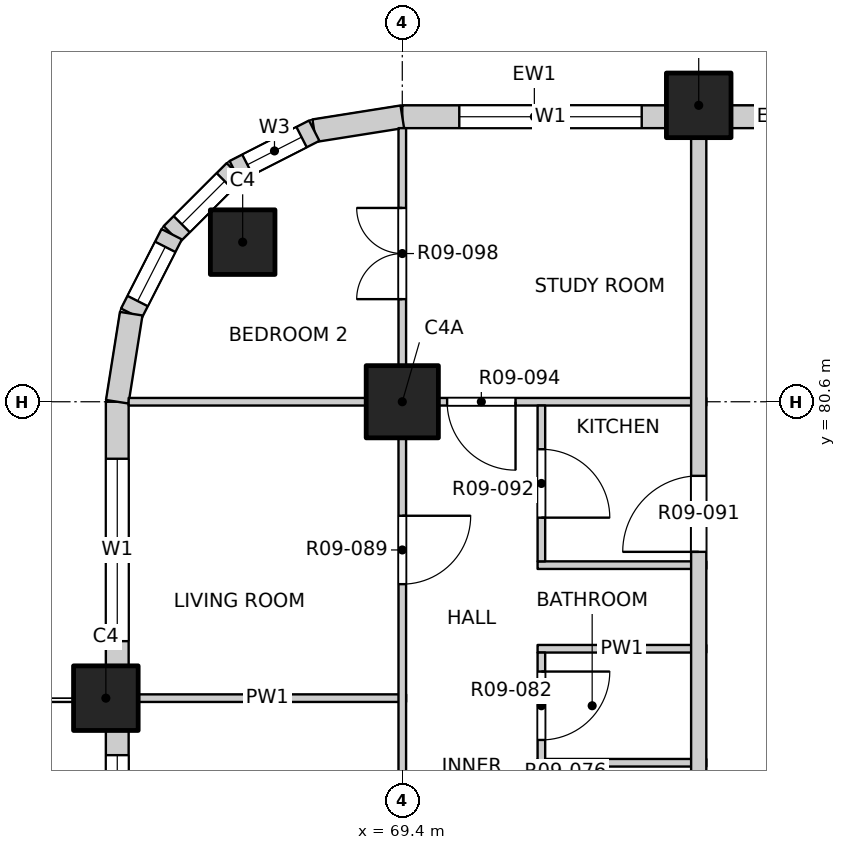
"""IFC4 building model, lengths in metres.
Left out: names, types, materials, properties, quantities, classifications, styles, units other than length and angle.
Written with IfcOpenShell. Run it as: python <this file> out.ifc"""

import sys

from ifc_helpers import new_model, si_unit, direction, frame, frame_2d, origin, origin_2d, place, context, subcontext, project, spatial, rectangle, extrude, element, fill, save


model = new_model("IFC4")
c1 = context("Model", 3, precision=1e-05, world=origin(), true_north=direction((0.0, 1.0)))
c2 = subcontext(c1, "Body", "Model", "MODEL_VIEW")
j1 = project(units=[si_unit("LENGTHUNIT", "METRE"), si_unit("PLANEANGLEUNIT", "RADIAN")], contexts=[c1])
p1 = place(None, origin())
s1 = spatial("IfcSite", under=j1, at=p1, CompositionType="ELEMENT")
p2 = place(p1, origin())
s2 = spatial("IfcBuilding", under=s1, at=p2, CompositionType="ELEMENT")
p3 = place(p2, frame((0.0, 0.0, 110.1)))
s3 = spatial("IfcBuildingStorey", under=s2, at=p3, CompositionType="ELEMENT", Elevation=110.1)
for number, where, z_axis, x_axis in (
    (1, (67.3, 82.7, -0.25), (0.0, 0.0, 1.0), (1.0, 0.0, 0.0)),
    (2, (73.3, 84.5, -0.25), (0.0, 0.0, 1.0), (1.0, 0.0, 0.0)),
    (3, (65.5, 76.7, -0.25), (0.0, 0.0, 1.0), (1.0, 0.0, 0.0)),
):
    element("IfcColumn", number, at=place(p3, frame(where, z_axis=z_axis, x_axis=x_axis)), inside=s3, PredefinedType="COLUMN", context=c2, shape_type="SweptSolid", body=[
        extrude(rectangle(XDim=0.85, YDim=0.85, at=origin_2d()), origin(), (0.0, 0.0, 1.0), 3.4),
    ])
p4 = place(p3, frame((69.4, 80.6, -0.25), z_axis=(0.0, 0.0, 1.0), x_axis=(1.0, 0.0, 0.0)))
e4 = element("IfcColumn", 4, at=p4, inside=s3, PredefinedType="COLUMN", context=c2, shape_type="SweptSolid", body=[
    extrude(rectangle(XDim=0.95, YDim=0.95, at=origin_2d()), origin(), (0.0, 0.0, 1.0), 3.4),
])
p5 = place(p3, frame((69.4, 84.35, 0.0), z_axis=(0.0, 0.0, 1.0), x_axis=(1.0, 0.0, 0.0)))
e5 = element("IfcWall", 5, at=p5, inside=s3, PredefinedType="SOLIDWALL", context=c2, shape_type="SweptSolid", body=[
    extrude(rectangle(XDim=3.475, YDim=0.3, at=frame_2d((1.738, 0.0))), origin(), (0.0, 0.0, 1.0), 2.7),
])
p6 = place(p5, frame((0.75, 0.0, 0.9)))
e6 = element("IfcOpeningElement", 6, at=p6, cuts=e5, PredefinedType="OPENING", context=c2, shape_type="SweptSolid", body=[
    extrude(rectangle(XDim=2.4, YDim=1.8, at=frame_2d((1.2, 0.9))), frame((0.0, 0.16, 0.0), z_axis=(0.0, -1.0, 0.0), x_axis=(1.0, 0.0, 0.0)), (0.0, 0.0, 1.0), 0.32),
])
p7 = place(p3, frame((73.725, 84.35, 0.0), z_axis=(0.0, 0.0, 1.0), x_axis=(1.0, 0.0, 0.0)))
e7 = element("IfcWall", 7, at=p7, inside=s3, PredefinedType="SOLIDWALL", context=c2, shape_type="SweptSolid", body=[
    extrude(rectangle(XDim=1.25, YDim=0.3, at=frame_2d((0.625, 0.0))), origin(), (0.0, 0.0, 1.0), 2.7),
])
p8 = place(p3, frame((65.65, 69.325, 0.0), z_axis=(0.0, 0.0, 1.0), x_axis=(0.0, 1.0, 0.0)))
e8 = element("IfcWall", 8, at=p8, inside=s3, PredefinedType="SOLIDWALL", context=c2, shape_type="SweptSolid", body=[
    extrude(rectangle(XDim=6.95, YDim=0.3, at=frame_2d((3.475, 0.0))), origin(), (0.0, 0.0, 1.0), 2.7),
])
p9 = place(p8, frame((0.625, 0.0, 0.0)))
e9 = element("IfcOpeningElement", 9, at=p9, cuts=e8, PredefinedType="OPENING", context=c2, shape_type="SweptSolid", body=[
    extrude(rectangle(XDim=1.8, YDim=2.4, at=frame_2d((0.9, 1.2))), frame((0.0, 0.16, 0.0), z_axis=(0.0, -1.0, 0.0), x_axis=(1.0, 0.0, 0.0)), (0.0, 0.0, 1.0), 0.32),
])
p10 = place(p8, frame((4.225, 0.0, 0.9)))
e10 = element("IfcOpeningElement", 10, at=p10, cuts=e8, PredefinedType="OPENING", context=c2, shape_type="SweptSolid", body=[
    extrude(rectangle(XDim=2.4, YDim=1.8, at=frame_2d((1.2, 0.9))), frame((0.0, 0.16, 0.0), z_axis=(0.0, -1.0, 0.0), x_axis=(1.0, 0.0, 0.0)), (0.0, 0.0, 1.0), 0.32),
])
p11 = place(p3, frame((65.65, 77.125, 0.0), z_axis=(0.0, 0.0, 1.0), x_axis=(0.0, 1.0, 0.0)))
e11 = element("IfcWall", 11, at=p11, inside=s3, PredefinedType="SOLIDWALL", context=c2, shape_type="SweptSolid", body=[
    extrude(rectangle(XDim=3.475, YDim=0.3, at=frame_2d((1.738, 0.0))), origin(), (0.0, 0.0, 1.0), 2.7),
])
p12 = place(p11, frame((0.325, 0.0, 0.9)))
e12 = element("IfcOpeningElement", 12, at=p12, cuts=e11, PredefinedType="OPENING", context=c2, shape_type="SweptSolid", body=[
    extrude(rectangle(XDim=2.4, YDim=1.8, at=frame_2d((1.2, 0.9))), frame((0.0, 0.16, 0.0), z_axis=(0.0, -1.0, 0.0), x_axis=(1.0, 0.0, 0.0)), (0.0, 0.0, 1.0), 0.32),
])
p13 = place(p3, frame((69.4, 84.35, 0.0), z_axis=(0.0, 0.0, 1.0), x_axis=(-0.987678452879, -0.156496880861, 0.0)))
e13 = element("IfcWall", 13, at=p13, inside=s3, PredefinedType="SOLIDWALL", context=c2, shape_type="SweptSolid", body=[
    extrude(rectangle(XDim=1.173, YDim=0.3, at=frame_2d((0.586, 0.0))), origin(), (0.0, 0.0, 1.0), 2.7),
])
p14 = place(p3, frame((68.241, 84.167, 0.0), z_axis=(0.0, 0.0, 1.0), x_axis=(-0.890988677504, -0.454025524128, 0.0)))
e14 = element("IfcWall", 14, at=p14, inside=s3, PredefinedType="SOLIDWALL", context=c2, shape_type="SweptSolid", body=[
    extrude(rectangle(XDim=1.173, YDim=0.3, at=frame_2d((0.587, 0.0))), origin(), (0.0, 0.0, 1.0), 2.7),
])
p15 = place(p14, frame((0.187, 0.0, 0.9)))
e15 = element("IfcOpeningElement", 15, at=p15, cuts=e14, PredefinedType="OPENING", context=c2, shape_type="SweptSolid", body=[
    extrude(rectangle(XDim=0.8, YDim=1.2, at=frame_2d((0.4, 0.6))), frame((0.0, 0.16, 0.0), z_axis=(0.0, -1.0, 0.0), x_axis=(1.0, 0.0, 0.0)), (0.0, 0.0, 1.0), 0.32),
])
p16 = place(p3, frame((67.196, 83.634, 0.0), z_axis=(0.0, 0.0, 1.0), x_axis=(-0.707106781187, -0.707106781187, 0.0)))
e16 = element("IfcWall", 16, at=p16, inside=s3, PredefinedType="SOLIDWALL", context=c2, shape_type="SweptSolid", body=[
    extrude(rectangle(XDim=1.173, YDim=0.3, at=frame_2d((0.586, 0.0))), origin(), (0.0, 0.0, 1.0), 2.7),
])
p17 = place(p16, frame((0.187, 0.0, 0.9)))
e17 = element("IfcOpeningElement", 17, at=p17, cuts=e16, PredefinedType="OPENING", context=c2, shape_type="SweptSolid", body=[
    extrude(rectangle(XDim=0.8, YDim=1.2, at=frame_2d((0.4, 0.6))), frame((0.0, 0.16, 0.0), z_axis=(0.0, -1.0, 0.0), x_axis=(1.0, 0.0, 0.0)), (0.0, 0.0, 1.0), 0.32),
])
p18 = place(p3, frame((66.366, 82.804, 0.0), z_axis=(0.0, 0.0, 1.0), x_axis=(-0.454025524128, -0.890988677504, 0.0)))
e18 = element("IfcWall", 18, at=p18, inside=s3, PredefinedType="SOLIDWALL", context=c2, shape_type="SweptSolid", body=[
    extrude(rectangle(XDim=1.173, YDim=0.3, at=frame_2d((0.587, 0.0))), origin(), (0.0, 0.0, 1.0), 2.7),
])
p19 = place(p18, frame((0.187, 0.0, 0.9)))
e19 = element("IfcOpeningElement", 19, at=p19, cuts=e18, PredefinedType="OPENING", context=c2, shape_type="SweptSolid", body=[
    extrude(rectangle(XDim=0.8, YDim=1.2, at=frame_2d((0.4, 0.6))), frame((0.0, 0.16, 0.0), z_axis=(0.0, -1.0, 0.0), x_axis=(1.0, 0.0, 0.0)), (0.0, 0.0, 1.0), 0.32),
])
p20 = place(p3, frame((65.833, 81.759, 0.0), z_axis=(0.0, 0.0, 1.0), x_axis=(-0.156496880861, -0.987678452879, 0.0)))
e20 = element("IfcWall", 20, at=p20, inside=s3, PredefinedType="SOLIDWALL", context=c2, shape_type="SweptSolid", body=[
    extrude(rectangle(XDim=1.173, YDim=0.3, at=frame_2d((0.586, 0.0))), origin(), (0.0, 0.0, 1.0), 2.7),
])
p21 = place(p3, frame((71.18, 75.85, 0.0), z_axis=(0.0, 0.0, 1.0), x_axis=(1.0, 0.0, 0.0)))
e21 = element("IfcWall", 21, at=p21, inside=s3, PredefinedType="PARTITIONING", context=c2, shape_type="SweptSolid", body=[
    extrude(rectangle(XDim=2.22, YDim=0.1, at=frame_2d((1.11, 0.0))), origin(), (0.0, 0.0, 1.0), 3.15),
])
p22 = place(p3, frame((65.8, 76.7, 0.0), z_axis=(0.0, 0.0, 1.0), x_axis=(1.0, 0.0, 0.0)))
e22 = element("IfcWall", 22, at=p22, inside=s3, PredefinedType="PARTITIONING", context=c2, shape_type="SweptSolid", body=[
    extrude(rectangle(XDim=3.65, YDim=0.1, at=frame_2d((1.825, 0.0))), origin(), (0.0, 0.0, 1.0), 2.55),
])
for number, where, z_axis, x_axis in (
    (23, (71.18, 77.35, 0.0), (0.0, 0.0, 1.0), (1.0, 0.0, 0.0)),
    (24, (71.18, 78.45, 0.0), (0.0, 0.0, 1.0), (1.0, 0.0, 0.0)),
):
    element("IfcWall", number, at=place(p3, frame(where, z_axis=z_axis, x_axis=x_axis)), inside=s3, PredefinedType="PARTITIONING", context=c2, shape_type="SweptSolid", body=[
        extrude(rectangle(XDim=2.22, YDim=0.1, at=frame_2d((1.11, 0.0))), origin(), (0.0, 0.0, 1.0), 3.15),
    ])
p23 = place(p3, frame((65.8, 80.6, 0.0), z_axis=(0.0, 0.0, 1.0), x_axis=(1.0, 0.0, 0.0)))
e25 = element("IfcWall", 25, at=p23, inside=s3, PredefinedType="PARTITIONING", context=c2, shape_type="SweptSolid", body=[
    extrude(rectangle(XDim=7.6, YDim=0.1, at=frame_2d((3.8, 0.0))), origin(), (0.0, 0.0, 1.0), 3.15),
])
p24 = place(p23, frame((4.19, 0.0, 0.0)))
e26 = element("IfcOpeningElement", 26, at=p24, cuts=e25, PredefinedType="OPENING", context=c2, shape_type="SweptSolid", body=[
    extrude(rectangle(XDim=0.9, YDim=2.1, at=frame_2d((0.45, 1.05))), frame((0.0, 0.06, 0.0), z_axis=(0.0, -1.0, 0.0), x_axis=(1.0, 0.0, 0.0)), (0.0, 0.0, 1.0), 0.12),
])
p25 = place(p3, frame((69.4, 45.8, 0.0), z_axis=(0.0, 0.0, 1.0), x_axis=(0.0, 1.0, 0.0)))
e27 = element("IfcWall", 27, at=p25, inside=s3, PredefinedType="PARTITIONING", context=c2, shape_type="SweptSolid", body=[
    extrude(rectangle(XDim=38.4, YDim=0.1, at=frame_2d((19.2, 0.0))), origin(), (0.0, 0.0, 1.0), 3.15),
])
p26 = place(p25, frame((1.05, 0.0, 0.0)))
e28 = element("IfcOpeningElement", 28, at=p26, cuts=e27, PredefinedType="OPENING", context=c2, shape_type="SweptSolid", body=[
    extrude(rectangle(XDim=1.2, YDim=2.1, at=frame_2d((0.6, 1.05))), frame((0.0, 0.06, 0.0), z_axis=(0.0, -1.0, 0.0), x_axis=(1.0, 0.0, 0.0)), (0.0, 0.0, 1.0), 0.12),
])
p27 = place(p25, frame((5.1, 0.0, 0.0)))
e29 = element("IfcOpeningElement", 29, at=p27, cuts=e27, PredefinedType="OPENING", context=c2, shape_type="SweptSolid", body=[
    extrude(rectangle(XDim=0.9, YDim=2.1, at=frame_2d((0.45, 1.05))), frame((0.0, 0.06, 0.0), z_axis=(0.0, -1.0, 0.0), x_axis=(1.0, 0.0, 0.0)), (0.0, 0.0, 1.0), 0.12),
])
p28 = place(p25, frame((9.0, 0.0, 0.0)))
e30 = element("IfcOpeningElement", 30, at=p28, cuts=e27, PredefinedType="OPENING", context=c2, shape_type="SweptSolid", body=[
    extrude(rectangle(XDim=0.9, YDim=2.1, at=frame_2d((0.45, 1.05))), frame((0.0, 0.06, 0.0), z_axis=(0.0, -1.0, 0.0), x_axis=(1.0, 0.0, 0.0)), (0.0, 0.0, 1.0), 0.12),
])
p29 = place(p25, frame((12.9, 0.0, 0.0)))
e31 = element("IfcOpeningElement", 31, at=p29, cuts=e27, PredefinedType="OPENING", context=c2, shape_type="SweptSolid", body=[
    extrude(rectangle(XDim=0.9, YDim=2.1, at=frame_2d((0.45, 1.05))), frame((0.0, 0.06, 0.0), z_axis=(0.0, -1.0, 0.0), x_axis=(1.0, 0.0, 0.0)), (0.0, 0.0, 1.0), 0.12),
])
p30 = place(p25, frame((16.8, 0.0, 0.0)))
e32 = element("IfcOpeningElement", 32, at=p30, cuts=e27, PredefinedType="OPENING", context=c2, shape_type="SweptSolid", body=[
    extrude(rectangle(XDim=0.9, YDim=2.1, at=frame_2d((0.45, 1.05))), frame((0.0, 0.06, 0.0), z_axis=(0.0, -1.0, 0.0), x_axis=(1.0, 0.0, 0.0)), (0.0, 0.0, 1.0), 0.12),
])
p31 = place(p25, frame((20.7, 0.0, 0.0)))
e33 = element("IfcOpeningElement", 33, at=p31, cuts=e27, PredefinedType="OPENING", context=c2, shape_type="SweptSolid", body=[
    extrude(rectangle(XDim=0.9, YDim=2.1, at=frame_2d((0.45, 1.05))), frame((0.0, 0.06, 0.0), z_axis=(0.0, -1.0, 0.0), x_axis=(1.0, 0.0, 0.0)), (0.0, 0.0, 1.0), 0.12),
])
p32 = place(p25, frame((24.6, 0.0, 0.0)))
e34 = element("IfcOpeningElement", 34, at=p32, cuts=e27, PredefinedType="OPENING", context=c2, shape_type="SweptSolid", body=[
    extrude(rectangle(XDim=0.9, YDim=2.1, at=frame_2d((0.45, 1.05))), frame((0.0, 0.06, 0.0), z_axis=(0.0, -1.0, 0.0), x_axis=(1.0, 0.0, 0.0)), (0.0, 0.0, 1.0), 0.12),
])
p33 = place(p25, frame((28.5, 0.0, 0.0)))
e35 = element("IfcOpeningElement", 35, at=p33, cuts=e27, PredefinedType="OPENING", context=c2, shape_type="SweptSolid", body=[
    extrude(rectangle(XDim=0.9, YDim=2.1, at=frame_2d((0.45, 1.05))), frame((0.0, 0.06, 0.0), z_axis=(0.0, -1.0, 0.0), x_axis=(1.0, 0.0, 0.0)), (0.0, 0.0, 1.0), 0.12),
])
p34 = place(p25, frame((32.4, 0.0, 0.0)))
e36 = element("IfcOpeningElement", 36, at=p34, cuts=e27, PredefinedType="OPENING", context=c2, shape_type="SweptSolid", body=[
    extrude(rectangle(XDim=0.9, YDim=2.1, at=frame_2d((0.45, 1.05))), frame((0.0, 0.06, 0.0), z_axis=(0.0, -1.0, 0.0), x_axis=(1.0, 0.0, 0.0)), (0.0, 0.0, 1.0), 0.12),
])
p35 = place(p25, frame((36.15, 0.0, 0.0)))
e37 = element("IfcOpeningElement", 37, at=p35, cuts=e27, PredefinedType="OPENING", context=c2, shape_type="SweptSolid", body=[
    extrude(rectangle(XDim=1.2, YDim=2.1, at=frame_2d((0.6, 1.05))), frame((0.0, 0.06, 0.0), z_axis=(0.0, -1.0, 0.0), x_axis=(1.0, 0.0, 0.0)), (0.0, 0.0, 1.0), 0.12),
])
p36 = place(p3, frame((71.23, 68.15, 0.0), z_axis=(0.0, 0.0, 1.0), x_axis=(0.0, 1.0, 0.0)))
e38 = element("IfcWall", 38, at=p36, inside=s3, PredefinedType="PARTITIONING", context=c2, shape_type="SweptSolid", body=[
    extrude(rectangle(XDim=9.15, YDim=0.1, at=frame_2d((4.575, 0.0))), origin(), (0.0, 0.0, 1.0), 3.15),
])
p37 = place(p36, frame((1.0, 0.0, 0.0)))
e39 = element("IfcOpeningElement", 39, at=p37, cuts=e38, PredefinedType="OPENING", context=c2, shape_type="SweptSolid", body=[
    extrude(rectangle(XDim=0.8, YDim=2.1, at=frame_2d((0.4, 1.05))), frame((0.0, 0.06, 0.0), z_axis=(0.0, -1.0, 0.0), x_axis=(1.0, 0.0, 0.0)), (0.0, 0.0, 1.0), 0.12),
])
p38 = place(p36, frame((3.3, 0.0, 0.0)))
e40 = element("IfcOpeningElement", 40, at=p38, cuts=e38, PredefinedType="OPENING", context=c2, shape_type="SweptSolid", body=[
    extrude(rectangle(XDim=0.9, YDim=2.1, at=frame_2d((0.45, 1.05))), frame((0.0, 0.06, 0.0), z_axis=(0.0, -1.0, 0.0), x_axis=(1.0, 0.0, 0.0)), (0.0, 0.0, 1.0), 0.12),
])
p39 = place(p36, frame((4.95, 0.0, 0.0)))
e41 = element("IfcOpeningElement", 41, at=p39, cuts=e38, PredefinedType="OPENING", context=c2, shape_type="SweptSolid", body=[
    extrude(rectangle(XDim=0.8, YDim=2.1, at=frame_2d((0.4, 1.05))), frame((0.0, 0.06, 0.0), z_axis=(0.0, -1.0, 0.0), x_axis=(1.0, 0.0, 0.0)), (0.0, 0.0, 1.0), 0.12),
])
p40 = place(p36, frame((6.425, 0.0, 0.0)))
e42 = element("IfcOpeningElement", 42, at=p40, cuts=e38, PredefinedType="OPENING", context=c2, shape_type="SweptSolid", body=[
    extrude(rectangle(XDim=0.9, YDim=2.1, at=frame_2d((0.45, 1.05))), frame((0.0, 0.06, 0.0), z_axis=(0.0, -1.0, 0.0), x_axis=(1.0, 0.0, 0.0)), (0.0, 0.0, 1.0), 0.12),
])
p41 = place(p36, frame((8.0, 0.0, 0.0)))
e43 = element("IfcOpeningElement", 43, at=p41, cuts=e38, PredefinedType="OPENING", context=c2, shape_type="SweptSolid", body=[
    extrude(rectangle(XDim=0.9, YDim=2.1, at=frame_2d((0.45, 1.05))), frame((0.0, 0.06, 0.0), z_axis=(0.0, -1.0, 0.0), x_axis=(1.0, 0.0, 0.0)), (0.0, 0.0, 1.0), 0.12),
])
p42 = place(p3, frame((71.23, 78.5, 0.0), z_axis=(0.0, 0.0, 1.0), x_axis=(0.0, 1.0, 0.0)))
e44 = element("IfcWall", 44, at=p42, inside=s3, PredefinedType="PARTITIONING", context=c2, shape_type="SweptSolid", body=[
    extrude(rectangle(XDim=2.05, YDim=0.1, at=frame_2d((1.025, 0.0))), origin(), (0.0, 0.0, 1.0), 3.15),
])
p43 = place(p42, frame((0.575, 0.0, 0.0)))
e45 = element("IfcOpeningElement", 45, at=p43, cuts=e44, PredefinedType="OPENING", context=c2, shape_type="SweptSolid", body=[
    extrude(rectangle(XDim=0.9, YDim=2.1, at=frame_2d((0.45, 1.05))), frame((0.0, 0.06, 0.0), z_axis=(0.0, -1.0, 0.0), x_axis=(1.0, 0.0, 0.0)), (0.0, 0.0, 1.0), 0.12),
])
p44 = place(p3, frame((73.3, 53.4, 0.0), z_axis=(0.0, 0.0, 1.0), x_axis=(0.0, 1.0, 0.0)))
e46 = element("IfcWall", 46, at=p44, inside=s3, PredefinedType="PARTITIONING", context=c2, shape_type="SweptSolid", body=[
    extrude(rectangle(XDim=30.8, YDim=0.2, at=frame_2d((15.4, 0.0))), origin(), (0.0, 0.0, 1.0), 3.15),
])
p45 = place(p44, frame((2.025, 0.0, 0.0)))
e47 = element("IfcOpeningElement", 47, at=p45, cuts=e46, PredefinedType="OPENING", context=c2, shape_type="SweptSolid", body=[
    extrude(rectangle(XDim=1.0, YDim=2.1, at=frame_2d((0.5, 1.05))), frame((0.0, 0.11, 0.0), z_axis=(0.0, -1.0, 0.0), x_axis=(1.0, 0.0, 0.0)), (0.0, 0.0, 1.0), 0.22),
])
p46 = place(p44, frame((14.875, 0.0, 0.0)))
e48 = element("IfcOpeningElement", 48, at=p46, cuts=e46, PredefinedType="OPENING", context=c2, shape_type="SweptSolid", body=[
    extrude(rectangle(XDim=1.0, YDim=2.1, at=frame_2d((0.5, 1.05))), frame((0.0, 0.11, 0.0), z_axis=(0.0, -1.0, 0.0), x_axis=(1.0, 0.0, 0.0)), (0.0, 0.0, 1.0), 0.22),
])
p47 = place(p44, frame((25.225, 0.0, 0.0)))
e49 = element("IfcOpeningElement", 49, at=p47, cuts=e46, PredefinedType="OPENING", context=c2, shape_type="SweptSolid", body=[
    extrude(rectangle(XDim=1.0, YDim=2.1, at=frame_2d((0.5, 1.05))), frame((0.0, 0.11, 0.0), z_axis=(0.0, -1.0, 0.0), x_axis=(1.0, 0.0, 0.0)), (0.0, 0.0, 1.0), 0.22),
])
p48 = place(p6, origin())
e50 = element("IfcWindow", 50, at=p48, inside=s3, PartitioningType="DOUBLE_PANEL_VERTICAL", PredefinedType="WINDOW", context=c2, shape_type="SweptSolid", body=[
    extrude(rectangle(XDim=2.4, YDim=1.8, at=frame_2d((1.2, 0.9))), frame((0.0, 0.03, 0.0), z_axis=(0.0, -1.0, 0.0), x_axis=(1.0, 0.0, 0.0)), (0.0, 0.0, 1.0), 0.06),
])
fill(e6, e50)
p49 = place(p10, origin())
e51 = element("IfcWindow", 51, at=p49, inside=s3, PartitioningType="DOUBLE_PANEL_VERTICAL", PredefinedType="WINDOW", context=c2, shape_type="SweptSolid", body=[
    extrude(rectangle(XDim=2.4, YDim=1.8, at=frame_2d((1.2, 0.9))), frame((0.0, 0.03, 0.0), z_axis=(0.0, -1.0, 0.0), x_axis=(1.0, 0.0, 0.0)), (0.0, 0.0, 1.0), 0.06),
])
fill(e10, e51)
p50 = place(p12, origin())
e52 = element("IfcWindow", 52, at=p50, inside=s3, PartitioningType="DOUBLE_PANEL_VERTICAL", PredefinedType="WINDOW", context=c2, shape_type="SweptSolid", body=[
    extrude(rectangle(XDim=2.4, YDim=1.8, at=frame_2d((1.2, 0.9))), frame((0.0, 0.03, 0.0), z_axis=(0.0, -1.0, 0.0), x_axis=(1.0, 0.0, 0.0)), (0.0, 0.0, 1.0), 0.06),
])
fill(e12, e52)
p51 = place(p15, origin())
e53 = element("IfcWindow", 53, at=p51, inside=s3, PartitioningType="SINGLE_PANEL", PredefinedType="WINDOW", context=c2, shape_type="SweptSolid", body=[
    extrude(rectangle(XDim=0.8, YDim=1.2, at=frame_2d((0.4, 0.6))), frame((0.0, 0.03, 0.0), z_axis=(0.0, -1.0, 0.0), x_axis=(1.0, 0.0, 0.0)), (0.0, 0.0, 1.0), 0.06),
])
fill(e15, e53)
p52 = place(p17, origin())
e54 = element("IfcWindow", 54, at=p52, inside=s3, PartitioningType="SINGLE_PANEL", PredefinedType="WINDOW", context=c2, shape_type="SweptSolid", body=[
    extrude(rectangle(XDim=0.8, YDim=1.2, at=frame_2d((0.4, 0.6))), frame((0.0, 0.03, 0.0), z_axis=(0.0, -1.0, 0.0), x_axis=(1.0, 0.0, 0.0)), (0.0, 0.0, 1.0), 0.06),
])
fill(e17, e54)
p53 = place(p19, origin())
e55 = element("IfcWindow", 55, at=p53, inside=s3, PartitioningType="SINGLE_PANEL", PredefinedType="WINDOW", context=c2, shape_type="SweptSolid", body=[
    extrude(rectangle(XDim=0.8, YDim=1.2, at=frame_2d((0.4, 0.6))), frame((0.0, 0.03, 0.0), z_axis=(0.0, -1.0, 0.0), x_axis=(1.0, 0.0, 0.0)), (0.0, 0.0, 1.0), 0.06),
])
fill(e19, e55)
p54 = place(p41, origin())
e56 = element("IfcDoor", 56, at=p54, inside=s3, OperationType="SINGLE_SWING_LEFT", PredefinedType="DOOR", context=c2, shape_type="SweptSolid", body=[
    extrude(rectangle(XDim=0.9, YDim=2.1, at=frame_2d((0.45, 1.05))), frame((0.0, 0.025, 0.0), z_axis=(0.0, -1.0, 0.0), x_axis=(1.0, 0.0, 0.0)), (0.0, 0.0, 1.0), 0.05),
])
fill(e43, e56)
p55 = place(p34, origin())
e57 = element("IfcDoor", 57, at=p55, inside=s3, OperationType="SINGLE_SWING_LEFT", PredefinedType="DOOR", context=c2, shape_type="SweptSolid", body=[
    extrude(rectangle(XDim=0.9, YDim=2.1, at=frame_2d((0.45, 1.05))), frame((0.0, 0.025, 0.0), z_axis=(0.0, -1.0, 0.0), x_axis=(1.0, 0.0, 0.0)), (0.0, 0.0, 1.0), 0.05),
])
fill(e36, e57)
p56 = place(p47, origin())
e58 = element("IfcDoor", 58, at=p56, inside=s3, OperationType="SINGLE_SWING_RIGHT", PredefinedType="DOOR", context=c2, shape_type="SweptSolid", body=[
    extrude(rectangle(XDim=1.0, YDim=2.1, at=frame_2d((0.5, 1.05))), frame((0.0, 0.025, 0.0), z_axis=(0.0, -1.0, 0.0), x_axis=(1.0, 0.0, 0.0)), (0.0, 0.0, 1.0), 0.05),
])
fill(e49, e58)
p57 = place(p43, origin())
e59 = element("IfcDoor", 59, at=p57, inside=s3, OperationType="SINGLE_SWING_RIGHT", PredefinedType="DOOR", context=c2, shape_type="SweptSolid", body=[
    extrude(rectangle(XDim=0.9, YDim=2.1, at=frame_2d((0.45, 1.05))), frame((0.0, 0.025, 0.0), z_axis=(0.0, -1.0, 0.0), x_axis=(1.0, 0.0, 0.0)), (0.0, 0.0, 1.0), 0.05),
])
fill(e45, e59)
p58 = place(p24, origin())
e60 = element("IfcDoor", 60, at=p58, inside=s3, OperationType="SINGLE_SWING_LEFT", PredefinedType="DOOR", context=c2, shape_type="SweptSolid", body=[
    extrude(rectangle(XDim=0.9, YDim=2.1, at=frame_2d((0.45, 1.05))), frame((0.0, 0.025, 0.0), z_axis=(0.0, -1.0, 0.0), x_axis=(1.0, 0.0, 0.0)), (0.0, 0.0, 1.0), 0.05),
])
fill(e26, e60)
p59 = place(p35, origin())
e61 = element("IfcDoor", 61, at=p59, inside=s3, OperationType="DOUBLE_DOOR_SINGLE_SWING", PredefinedType="DOOR", context=c2, shape_type="SweptSolid", body=[
    extrude(rectangle(XDim=1.2, YDim=2.1, at=frame_2d((0.6, 1.05))), frame((0.0, 0.025, 0.0), z_axis=(0.0, -1.0, 0.0), x_axis=(1.0, 0.0, 0.0)), (0.0, 0.0, 1.0), 0.05),
])
fill(e37, e61)
save(model, sys.argv[1])
